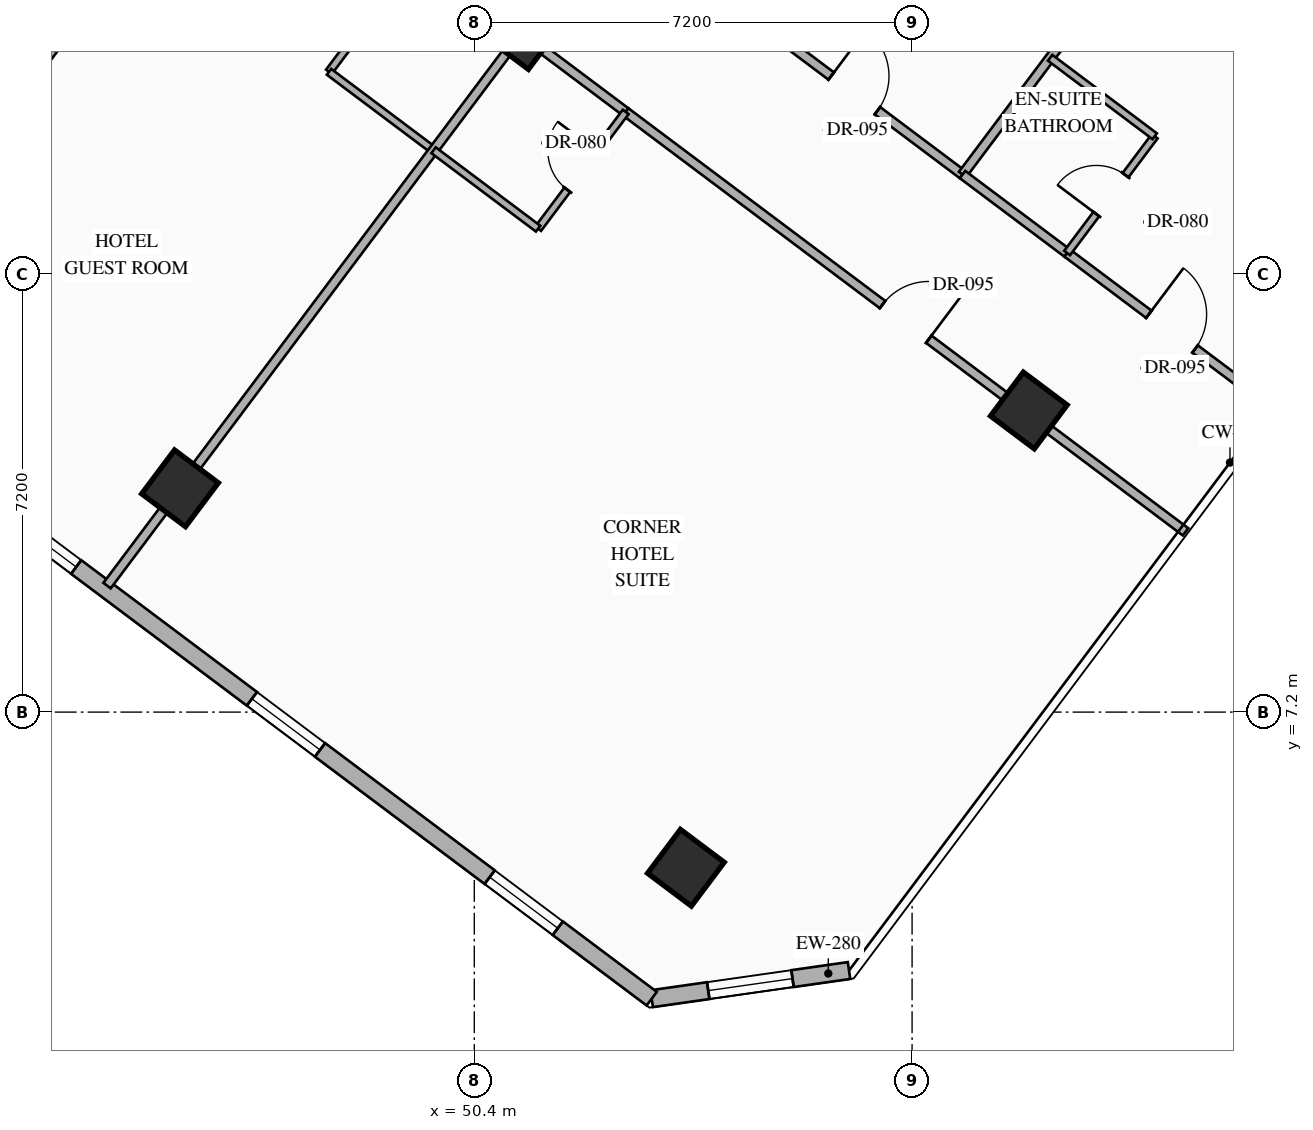
"""IFC4 building model, lengths in metres.
Left out: names, types, materials, properties, quantities, classifications, styles, units other than length and angle.
Written with IfcOpenShell. Run it as: python <this file> out.ifc"""

import sys

from ifc_helpers import new_model, si_unit, direction, frame, frame_2d, origin, origin_2d, place, context, subcontext, project, spatial, rectangle, hollow_rectangle, extrude, element, fill, save


model = new_model("IFC4")
c1 = context("Model", 3, precision=1e-05, world=origin(), true_north=direction((0.0, 1.0)))
c2 = subcontext(c1, "Body", "Model", "MODEL_VIEW")
j1 = project(units=[si_unit("LENGTHUNIT", "METRE"), si_unit("PLANEANGLEUNIT", "RADIAN")], contexts=[c1])
p1 = place(None, origin())
s1 = spatial("IfcSite", under=j1, at=p1, CompositionType="ELEMENT")
p2 = place(p1, origin())
s2 = spatial("IfcBuilding", under=s1, at=p2, CompositionType="ELEMENT")
p3 = place(p2, frame((0.0, 0.0, 77.95)))
s3 = spatial("IfcBuildingStorey", under=s2, at=p3, CompositionType="ELEMENT", Elevation=77.95)
for number, where, z_axis, x_axis in (
    (1, (45.56, 10.88, 0.0), (0.0, 0.0, 1.0), (0.8, -0.6, 0.0)),
    (2, (51.2, 18.4, 0.0), (0.0, 0.0, 1.0), (0.8, -0.6, 0.0)),
    (3, (53.88, 4.64, 0.0), (0.0, 0.0, 1.0), (0.8, -0.6, 0.0)),
    (4, (59.52, 12.16, 0.0), (0.0, 0.0, 1.0), (0.8, -0.6, 0.0)),
):
    element("IfcColumn", number, at=place(p3, frame(where, z_axis=z_axis, x_axis=x_axis)), inside=s3, PredefinedType="COLUMN", context=c2, shape_type="SweptSolid", body=[
        extrude(hollow_rectangle(XDim=0.9, YDim=0.9, WallThickness=0.036, at=origin_2d()), origin(), (0.0, 0.0, 1.0), 3.35),
    ])
p4 = place(p3, frame((56.563, 2.95, 0.0), z_axis=(0.0, 0.0, 1.0), x_axis=(-0.989977778067, -0.141223223777, 0.0)))
e5 = element("IfcWall", 5, at=p4, inside=s3, PredefinedType="STANDARD", context=c2, shape_type="SweptSolid", body=[
    extrude(rectangle(XDim=3.278, YDim=0.28, at=frame_2d((1.639, 0.0))), origin(), (0.0, 0.0, 1.0), 3.13),
])
p5 = place(p4, frame((0.939, 0.0, 0.85)))
e6 = element("IfcOpeningElement", 6, at=p5, cuts=e5, PredefinedType="OPENING", context=c2, shape_type="SweptSolid", body=[
    extrude(rectangle(XDim=1.4, YDim=1.8, at=frame_2d((0.7, 0.9))), frame((0.0, 0.15, 0.0), z_axis=(0.0, -1.0, 0.0), x_axis=(1.0, 0.0, 0.0)), (0.0, 0.0, 1.0), 0.3),
])
p6 = place(p3, frame((53.318, 2.487, 0.0), z_axis=(0.0, 0.0, 1.0), x_axis=(-0.800004174678, 0.599994433723, 0.0)))
e7 = element("IfcWall", 7, at=p6, inside=s3, PredefinedType="STANDARD", context=c2, shape_type="SweptSolid", body=[
    extrude(rectangle(XDim=35.089, YDim=0.28, at=frame_2d((17.544, 0.0))), origin(), (0.0, 0.0, 1.0), 3.13),
])
p7 = place(p6, frame((1.931, 0.0, 0.85)))
e8 = element("IfcOpeningElement", 8, at=p7, cuts=e7, PredefinedType="OPENING", context=c2, shape_type="SweptSolid", body=[
    extrude(rectangle(XDim=1.4, YDim=1.8, at=frame_2d((0.7, 0.9))), frame((0.0, 0.15, 0.0), z_axis=(0.0, -1.0, 0.0), x_axis=(1.0, 0.0, 0.0)), (0.0, 0.0, 1.0), 0.3),
])
p8 = place(p6, frame((6.819, 0.0, 0.85)))
e9 = element("IfcOpeningElement", 9, at=p8, cuts=e7, PredefinedType="OPENING", context=c2, shape_type="SweptSolid", body=[
    extrude(rectangle(XDim=1.4, YDim=1.8, at=frame_2d((0.7, 0.9))), frame((0.0, 0.15, 0.0), z_axis=(0.0, -1.0, 0.0), x_axis=(1.0, 0.0, 0.0)), (0.0, 0.0, 1.0), 0.3),
])
p9 = place(p6, frame((11.832, 0.0, 0.85)))
e10 = element("IfcOpeningElement", 10, at=p9, cuts=e7, PredefinedType="OPENING", context=c2, shape_type="SweptSolid", body=[
    extrude(rectangle(XDim=1.4, YDim=1.8, at=frame_2d((0.7, 0.9))), frame((0.0, 0.15, 0.0), z_axis=(0.0, -1.0, 0.0), x_axis=(1.0, 0.0, 0.0)), (0.0, 0.0, 1.0), 0.3),
])
p10 = place(p6, frame((17.647, 0.0, 0.85)))
e11 = element("IfcOpeningElement", 11, at=p10, cuts=e7, PredefinedType="OPENING", context=c2, shape_type="SweptSolid", body=[
    extrude(rectangle(XDim=1.4, YDim=1.8, at=frame_2d((0.7, 0.9))), frame((0.0, 0.15, 0.0), z_axis=(0.0, -1.0, 0.0), x_axis=(1.0, 0.0, 0.0)), (0.0, 0.0, 1.0), 0.3),
])
p11 = place(p6, frame((21.857, 0.0, 0.85)))
e12 = element("IfcOpeningElement", 12, at=p11, cuts=e7, PredefinedType="OPENING", context=c2, shape_type="SweptSolid", body=[
    extrude(rectangle(XDim=1.4, YDim=1.8, at=frame_2d((0.7, 0.9))), frame((0.0, 0.15, 0.0), z_axis=(0.0, -1.0, 0.0), x_axis=(1.0, 0.0, 0.0)), (0.0, 0.0, 1.0), 0.3),
])
p12 = place(p6, frame((26.87, 0.0, 0.85)))
e13 = element("IfcOpeningElement", 13, at=p12, cuts=e7, PredefinedType="OPENING", context=c2, shape_type="SweptSolid", body=[
    extrude(rectangle(XDim=1.4, YDim=1.8, at=frame_2d((0.7, 0.9))), frame((0.0, 0.15, 0.0), z_axis=(0.0, -1.0, 0.0), x_axis=(1.0, 0.0, 0.0)), (0.0, 0.0, 1.0), 0.3),
])
p13 = place(p6, frame((31.757, 0.0, 0.85)))
e14 = element("IfcOpeningElement", 14, at=p13, cuts=e7, PredefinedType="OPENING", context=c2, shape_type="SweptSolid", body=[
    extrude(rectangle(XDim=1.4, YDim=1.8, at=frame_2d((0.7, 0.9))), frame((0.0, 0.15, 0.0), z_axis=(0.0, -1.0, 0.0), x_axis=(1.0, 0.0, 0.0)), (0.0, 0.0, 1.0), 0.3),
])
p14 = place(p3, frame((39.464, 12.752, 0.0), z_axis=(0.0, 0.0, 1.0), x_axis=(0.6, 0.8, 0.0)))
e15 = element("IfcWall", 15, at=p14, inside=s3, PredefinedType="PARTITIONING", context=c2, shape_type="SweptSolid", body=[
    extrude(rectangle(XDim=11.51, YDim=0.15, at=frame_2d((5.755, 0.0))), origin(), (0.0, 0.0, 1.0), 3.13),
])
p15 = place(p3, frame((54.87, 18.71, 0.0), z_axis=(0.0, 0.0, 1.0), x_axis=(0.799993416095, -0.600008778439, 0.0)))
e16 = element("IfcWall", 16, at=p15, inside=s3, PredefinedType="PARTITIONING", context=c2, shape_type="SweptSolid", body=[
    extrude(rectangle(XDim=4.45, YDim=0.15, at=frame_2d((2.225, 0.0))), origin(), (0.0, 0.0, 1.0), 2.775),
])
p16 = place(p15, frame((1.75, 0.0, 0.0)))
e17 = element("IfcOpeningElement", 17, at=p16, cuts=e16, PredefinedType="OPENING", context=c2, shape_type="SweptSolid", body=[
    extrude(rectangle(XDim=0.95, YDim=2.15, at=frame_2d((0.475, 1.075))), frame((0.0, 0.085, 0.0), z_axis=(0.0, -1.0, 0.0), x_axis=(1.0, 0.0, 0.0)), (0.0, 0.0, 1.0), 0.17),
])
p17 = place(p3, frame((58.43, 16.04, 0.0), z_axis=(0.0, 0.0, 1.0), x_axis=(0.60001014597, 0.799992390422, 0.0)))
e18 = element("IfcWall", 18, at=p17, inside=s3, PredefinedType="PARTITIONING", context=c2, shape_type="SweptSolid", body=[
    extrude(rectangle(XDim=11.55, YDim=0.15, at=frame_2d((5.775, 0.0))), origin(), (0.0, 0.0, 1.0), 3.13),
])
p18 = place(p3, frame((58.43, 16.04, 0.0), z_axis=(0.0, 0.0, 1.0), x_axis=(0.79998637334, -0.60001816845, 0.0)))
e19 = element("IfcWall", 19, at=p18, inside=s3, PredefinedType="PARTITIONING", context=c2, shape_type="SweptSolid", body=[
    extrude(rectangle(XDim=2.15, YDim=0.15, at=frame_2d((1.075, 0.0))), origin(), (0.0, 0.0, 1.0), 2.775),
])
p19 = place(p3, frame((60.15, 14.75, 0.0), z_axis=(0.0, 0.0, 1.0), x_axis=(0.800006797429, -0.599990936654, 0.0)))
e20 = element("IfcWall", 20, at=p19, inside=s3, PredefinedType="PARTITIONING", context=c2, shape_type="SweptSolid", body=[
    extrude(rectangle(XDim=4.31, YDim=0.15, at=frame_2d((2.155, 0.0))), origin(), (0.0, 0.0, 1.0), 2.775),
])
p20 = place(p19, frame((1.68, 0.0, 0.0)))
e21 = element("IfcOpeningElement", 21, at=p20, cuts=e20, PredefinedType="OPENING", context=c2, shape_type="SweptSolid", body=[
    extrude(rectangle(XDim=0.95, YDim=2.15, at=frame_2d((0.475, 1.075))), frame((0.0, 0.085, 0.0), z_axis=(0.0, -1.0, 0.0), x_axis=(1.0, 0.0, 0.0)), (0.0, 0.0, 1.0), 0.17),
])
p21 = place(p3, frame((60.15, 14.75, 0.0), z_axis=(0.0, 0.0, 1.0), x_axis=(0.600065100855, 0.79995117022, 0.0)))
e22 = element("IfcWall", 22, at=p21, inside=s3, PredefinedType="PARTITIONING", context=c2, shape_type="SweptSolid", body=[
    extrude(rectangle(XDim=2.4, YDim=0.12, at=frame_2d((1.2, 0.0))), origin(), (0.0, 0.0, 1.0), 3.13),
])
p22 = place(p21, frame((0.8, 0.0, 0.0)))
e23 = element("IfcOpeningElement", 23, at=p22, cuts=e22, PredefinedType="OPENING", context=c2, shape_type="SweptSolid", body=[
    extrude(rectangle(XDim=0.8, YDim=2.06, at=frame_2d((0.4, 1.03))), frame((0.0, 0.07, 0.0), z_axis=(0.0, -1.0, 0.0), x_axis=(1.0, 0.0, 0.0)), (0.0, 0.0, 1.0), 0.14),
])
p23 = place(p3, frame((59.87, 17.96, 0.0), z_axis=(0.0, 0.0, 1.0), x_axis=(0.79998637334, -0.60001816845, 0.0)))
e24 = element("IfcWall", 24, at=p23, inside=s3, PredefinedType="PARTITIONING", context=c2, shape_type="SweptSolid", body=[
    extrude(rectangle(XDim=2.15, YDim=0.12, at=frame_2d((1.075, 0.0))), origin(), (0.0, 0.0, 1.0), 3.13),
])
p24 = place(p3, frame((48.01, 17.73, 0.0), z_axis=(0.0, 0.0, 1.0), x_axis=(0.6, 0.8, 0.0)))
e25 = element("IfcWall", 25, at=p24, inside=s3, PredefinedType="PARTITIONING", context=c2, shape_type="SweptSolid", body=[
    extrude(rectangle(XDim=2.4, YDim=0.12, at=frame_2d((1.2, 0.0))), origin(), (0.0, 0.0, 1.0), 3.13),
])
p25 = place(p24, frame((0.8, 0.0, 0.0)))
e26 = element("IfcOpeningElement", 26, at=p25, cuts=e25, PredefinedType="OPENING", context=c2, shape_type="SweptSolid", body=[
    extrude(rectangle(XDim=0.8, YDim=2.06, at=frame_2d((0.4, 1.03))), frame((0.0, 0.07, 0.0), z_axis=(0.0, -1.0, 0.0), x_axis=(1.0, 0.0, 0.0)), (0.0, 0.0, 1.0), 0.14),
])
p26 = place(p3, frame((48.01, 17.73, 0.0), z_axis=(0.0, 0.0, 1.0), x_axis=(0.79998637334, -0.60001816845, 0.0)))
e27 = element("IfcWall", 27, at=p26, inside=s3, PredefinedType="PARTITIONING", context=c2, shape_type="SweptSolid", body=[
    extrude(rectangle(XDim=2.15, YDim=0.12, at=frame_2d((1.075, 0.0))), origin(), (0.0, 0.0, 1.0), 3.13),
])
p27 = place(p3, frame((44.36, 9.28, 0.0), z_axis=(0.0, 0.0, 1.0), x_axis=(0.599986233332, 0.800010324816, 0.0)))
e28 = element("IfcWall", 28, at=p27, inside=s3, PredefinedType="PARTITIONING", context=c2, shape_type="SweptSolid", body=[
    extrude(rectangle(XDim=11.35, YDim=0.15, at=frame_2d((5.675, 0.0))), origin(), (0.0, 0.0, 1.0), 2.425),
])
p28 = place(p3, frame((51.17, 18.36, 0.0), z_axis=(0.0, 0.0, 1.0), x_axis=(0.79998637334, -0.60001816845, 0.0)))
e29 = element("IfcWall", 29, at=p28, inside=s3, PredefinedType="PARTITIONING", context=c2, shape_type="SweptSolid", body=[
    extrude(rectangle(XDim=2.15, YDim=0.15, at=frame_2d((1.075, 0.0))), origin(), (0.0, 0.0, 1.0), 2.425),
])
p29 = place(p3, frame((52.89, 17.07, 0.0), z_axis=(0.0, 0.0, 1.0), x_axis=(0.8, -0.6, 0.0)))
e30 = element("IfcWall", 30, at=p29, inside=s3, PredefinedType="PARTITIONING", context=c2, shape_type="SweptSolid", body=[
    extrude(rectangle(XDim=11.51, YDim=0.15, at=frame_2d((5.755, 0.0))), origin(), (0.0, 0.0, 1.0), 2.425),
])
p30 = place(p29, frame((5.28, 0.0, 0.0)))
e31 = element("IfcOpeningElement", 31, at=p30, cuts=e30, PredefinedType="OPENING", context=c2, shape_type="SweptSolid", body=[
    extrude(rectangle(XDim=0.95, YDim=2.15, at=frame_2d((0.475, 1.075))), frame((0.0, 0.085, 0.0), z_axis=(0.0, -1.0, 0.0), x_axis=(1.0, 0.0, 0.0)), (0.0, 0.0, 1.0), 0.17),
])
p31 = place(p3, frame((51.45, 15.15, 0.0), z_axis=(0.0, 0.0, 1.0), x_axis=(0.599951172744, 0.800036618114, 0.0)))
e32 = element("IfcWall", 32, at=p31, inside=s3, PredefinedType="PARTITIONING", context=c2, shape_type="SweptSolid", body=[
    extrude(rectangle(XDim=2.4, YDim=0.12, at=frame_2d((1.2, 0.0))), origin(), (0.0, 0.0, 1.0), 3.13),
])
p32 = place(p31, frame((0.8, 0.0, 0.0)))
e33 = element("IfcOpeningElement", 33, at=p32, cuts=e32, PredefinedType="OPENING", context=c2, shape_type="SweptSolid", body=[
    extrude(rectangle(XDim=0.8, YDim=2.06, at=frame_2d((0.4, 1.03))), frame((0.0, 0.07, 0.0), z_axis=(0.0, -1.0, 0.0), x_axis=(1.0, 0.0, 0.0)), (0.0, 0.0, 1.0), 0.14),
])
p33 = place(p3, frame((49.73, 16.44, 0.0), z_axis=(0.0, 0.0, 1.0), x_axis=(0.79998637334, -0.60001816845, 0.0)))
e34 = element("IfcWall", 34, at=p33, inside=s3, PredefinedType="PARTITIONING", context=c2, shape_type="SweptSolid", body=[
    extrude(rectangle(XDim=2.15, YDim=0.12, at=frame_2d((1.075, 0.0))), origin(), (0.0, 0.0, 1.0), 3.13),
])
p34 = place(p5, origin())
e35 = element("IfcWindow", 35, at=p34, inside=s3, PartitioningType="SINGLE_PANEL", PredefinedType="WINDOW", context=c2, shape_type="SweptSolid", body=[
    extrude(rectangle(XDim=1.4, YDim=1.8, at=frame_2d((0.7, 0.9))), frame((0.0, 0.03, 0.0), z_axis=(0.0, -1.0, 0.0), x_axis=(1.0, 0.0, 0.0)), (0.0, 0.0, 1.0), 0.06),
])
fill(e6, e35)
p35 = place(p7, origin())
e36 = element("IfcWindow", 36, at=p35, inside=s3, PartitioningType="SINGLE_PANEL", PredefinedType="WINDOW", context=c2, shape_type="SweptSolid", body=[
    extrude(rectangle(XDim=1.4, YDim=1.8, at=frame_2d((0.7, 0.9))), frame((0.0, 0.03, 0.0), z_axis=(0.0, -1.0, 0.0), x_axis=(1.0, 0.0, 0.0)), (0.0, 0.0, 1.0), 0.06),
])
fill(e8, e36)
p36 = place(p8, origin())
e37 = element("IfcWindow", 37, at=p36, inside=s3, PartitioningType="SINGLE_PANEL", PredefinedType="WINDOW", context=c2, shape_type="SweptSolid", body=[
    extrude(rectangle(XDim=1.4, YDim=1.8, at=frame_2d((0.7, 0.9))), frame((0.0, 0.03, 0.0), z_axis=(0.0, -1.0, 0.0), x_axis=(1.0, 0.0, 0.0)), (0.0, 0.0, 1.0), 0.06),
])
fill(e9, e37)
p37 = place(p9, origin())
e38 = element("IfcWindow", 38, at=p37, inside=s3, PartitioningType="SINGLE_PANEL", PredefinedType="WINDOW", context=c2, shape_type="SweptSolid", body=[
    extrude(rectangle(XDim=1.4, YDim=1.8, at=frame_2d((0.7, 0.9))), frame((0.0, 0.03, 0.0), z_axis=(0.0, -1.0, 0.0), x_axis=(1.0, 0.0, 0.0)), (0.0, 0.0, 1.0), 0.06),
])
fill(e10, e38)
p38 = place(p16, origin())
e39 = element("IfcDoor", 39, at=p38, inside=s3, OperationType="SINGLE_SWING_LEFT", PredefinedType="DOOR", context=c2, shape_type="SweptSolid", body=[
    extrude(rectangle(XDim=0.95, YDim=2.15, at=frame_2d((0.475, 1.075))), frame((0.0, 0.025, 0.0), z_axis=(0.0, -1.0, 0.0), x_axis=(1.0, 0.0, 0.0)), (0.0, 0.0, 1.0), 0.05),
])
fill(e17, e39)
p39 = place(p20, origin())
e40 = element("IfcDoor", 40, at=p39, inside=s3, OperationType="SINGLE_SWING_LEFT", PredefinedType="DOOR", context=c2, shape_type="SweptSolid", body=[
    extrude(rectangle(XDim=0.95, YDim=2.15, at=frame_2d((0.475, 1.075))), frame((0.0, 0.025, 0.0), z_axis=(0.0, -1.0, 0.0), x_axis=(1.0, 0.0, 0.0)), (0.0, 0.0, 1.0), 0.05),
])
fill(e21, e40)
p40 = place(p22, origin())
e41 = element("IfcDoor", 41, at=p40, inside=s3, OperationType="SINGLE_SWING_LEFT", PredefinedType="DOOR", context=c2, shape_type="SweptSolid", body=[
    extrude(rectangle(XDim=0.8, YDim=2.06, at=frame_2d((0.4, 1.03))), frame((0.0, 0.025, 0.0), z_axis=(0.0, -1.0, 0.0), x_axis=(1.0, 0.0, 0.0)), (0.0, 0.0, 1.0), 0.05),
])
fill(e23, e41)
p41 = place(p30, origin())
e42 = element("IfcDoor", 42, at=p41, inside=s3, OperationType="SINGLE_SWING_RIGHT", PredefinedType="DOOR", context=c2, shape_type="SweptSolid", body=[
    extrude(rectangle(XDim=0.95, YDim=2.15, at=frame_2d((0.475, 1.075))), frame((0.0, 0.025, 0.0), z_axis=(0.0, -1.0, 0.0), x_axis=(1.0, 0.0, 0.0)), (0.0, 0.0, 1.0), 0.05),
])
fill(e31, e42)
p42 = place(p32, origin())
e43 = element("IfcDoor", 43, at=p42, inside=s3, OperationType="SINGLE_SWING_RIGHT", PredefinedType="DOOR", context=c2, shape_type="SweptSolid", body=[
    extrude(rectangle(XDim=0.8, YDim=2.06, at=frame_2d((0.4, 1.03))), frame((0.0, 0.025, 0.0), z_axis=(0.0, -1.0, 0.0), x_axis=(1.0, 0.0, 0.0)), (0.0, 0.0, 1.0), 0.05),
])
fill(e33, e43)
save(model, sys.argv[1])
